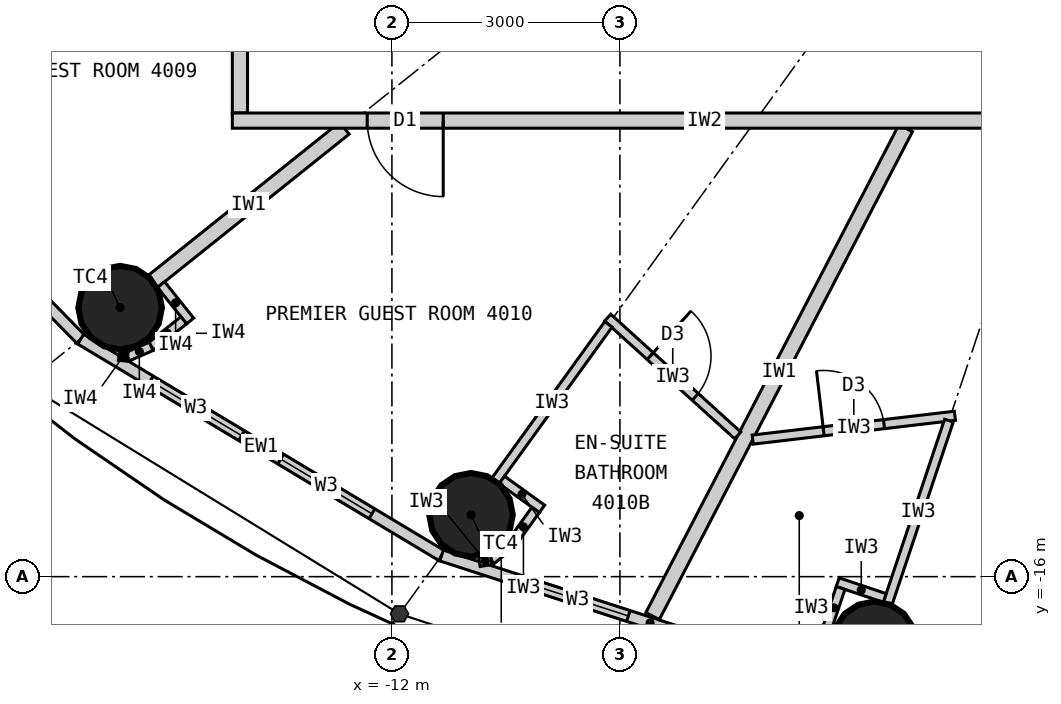
"""IFC4 building model, lengths in metres.
Left out: names, types, materials, properties, quantities, classifications, styles, units other than length and angle.
Written with IfcOpenShell. Run it as: python <this file> out.ifc"""

import sys

from ifc_helpers import new_model, si_unit, direction, frame, frame_2d, origin, origin_2d, place, context, subcontext, project, spatial, rectangle, circle, extrude, element, fill, save


model = new_model("IFC4")
c1 = context("Model", 3, precision=1e-05, world=origin(), true_north=direction((0.0, 1.0)))
c2 = subcontext(c1, "Body", "Model", "MODEL_VIEW")
j1 = project(units=[si_unit("LENGTHUNIT", "METRE"), si_unit("PLANEANGLEUNIT", "RADIAN")], contexts=[c1])
p1 = place(None, origin())
s1 = spatial("IfcSite", under=j1, at=p1, CompositionType="ELEMENT")
p2 = place(p1, origin())
s2 = spatial("IfcBuilding", under=s1, at=p2, CompositionType="ELEMENT")
p3 = place(p2, frame((0.0, 0.0, 153.3)))
s3 = spatial("IfcBuildingStorey", under=s2, at=p3, CompositionType="ELEMENT", Elevation=153.3)
for number, where, z_axis, x_axis in (
    (1, (-15.576, -12.461, 0.0), (0.0, 0.0, 1.0), (1.0, 0.0, 0.0)),
    (2, (-10.96, -15.186, 0.0), (0.0, 0.0, 1.0), (1.0, 0.0, 0.0)),
    (3, (-5.653, -16.877, 0.0), (0.0, 0.0, 1.0), (1.0, 0.0, 0.0)),
):
    element("IfcColumn", number, at=place(p3, frame(where, z_axis=z_axis, x_axis=x_axis)), inside=s3, PredefinedType="COLUMN", context=c2, shape_type="SweptSolid", body=[
        extrude(circle(Radius=0.55, at=origin_2d()), origin(), (0.0, 0.0, 1.0), 3.3),
    ])
p4 = place(p3, frame((-19.772, -9.132, 0.0), z_axis=(0.0, 0.0, 1.0), x_axis=(0.700727467776, -0.71342905457, 0.0)))
e4 = element("IfcWall", 4, at=p4, inside=s3, PredefinedType="ELEMENTEDWALL", context=c2, shape_type="SweptSolid", body=[
    extrude(rectangle(XDim=5.247, YDim=0.15, at=frame_2d((2.624, 0.0))), origin(), (0.0, 0.0, 1.0), 3.12),
])
p5 = place(p4, frame((0.924, 0.0, 0.9)))
e5 = element("IfcOpeningElement", 5, at=p5, cuts=e4, PredefinedType="OPENING", context=c2, shape_type="SweptSolid", body=[
    extrude(rectangle(XDim=1.4, YDim=1.9, at=frame_2d((0.7, 0.95))), frame((0.0, 0.085, 0.0), z_axis=(0.0, -1.0, 0.0), x_axis=(1.0, 0.0, 0.0)), (0.0, 0.0, 1.0), 0.17),
])
p6 = place(p4, frame((2.924, 0.0, 0.9)))
e6 = element("IfcOpeningElement", 6, at=p6, cuts=e4, PredefinedType="OPENING", context=c2, shape_type="SweptSolid", body=[
    extrude(rectangle(XDim=1.4, YDim=1.9, at=frame_2d((0.7, 0.95))), frame((0.0, 0.085, 0.0), z_axis=(0.0, -1.0, 0.0), x_axis=(1.0, 0.0, 0.0)), (0.0, 0.0, 1.0), 0.17),
])
p7 = place(p3, frame((-16.095, -12.876, 0.0), z_axis=(0.0, 0.0, 1.0), x_axis=(0.857695199231, -0.514158482587, 0.0)))
e7 = element("IfcWall", 7, at=p7, inside=s3, PredefinedType="ELEMENTEDWALL", context=c2, shape_type="SweptSolid", body=[
    extrude(rectangle(XDim=5.536, YDim=0.15, at=frame_2d((2.768, 0.0))), origin(), (0.0, 0.0, 1.0), 3.12),
])
p8 = place(p7, frame((1.068, 0.0, 0.9)))
e8 = element("IfcOpeningElement", 8, at=p8, cuts=e7, PredefinedType="OPENING", context=c2, shape_type="SweptSolid", body=[
    extrude(rectangle(XDim=1.4, YDim=1.9, at=frame_2d((0.7, 0.95))), frame((0.0, 0.085, 0.0), z_axis=(0.0, -1.0, 0.0), x_axis=(1.0, 0.0, 0.0)), (0.0, 0.0, 1.0), 0.17),
])
p9 = place(p7, frame((3.068, 0.0, 0.9)))
e9 = element("IfcOpeningElement", 9, at=p9, cuts=e7, PredefinedType="OPENING", context=c2, shape_type="SweptSolid", body=[
    extrude(rectangle(XDim=1.4, YDim=1.9, at=frame_2d((0.7, 0.95))), frame((0.0, 0.085, 0.0), z_axis=(0.0, -1.0, 0.0), x_axis=(1.0, 0.0, 0.0)), (0.0, 0.0, 1.0), 0.17),
])
p10 = place(p3, frame((-11.346, -15.722, 0.0), z_axis=(0.0, 0.0, 1.0), x_axis=(0.951432482129, -0.307857486429, 0.0)))
e10 = element("IfcWall", 10, at=p10, inside=s3, PredefinedType="ELEMENTEDWALL", context=c2, shape_type="SweptSolid", body=[
    extrude(rectangle(XDim=5.766, YDim=0.15, at=frame_2d((2.883, 0.0))), origin(), (0.0, 0.0, 1.0), 3.12),
])
p11 = place(p10, frame((1.183, 0.0, 0.9)))
e11 = element("IfcOpeningElement", 11, at=p11, cuts=e10, PredefinedType="OPENING", context=c2, shape_type="SweptSolid", body=[
    extrude(rectangle(XDim=1.4, YDim=1.9, at=frame_2d((0.7, 0.95))), frame((0.0, 0.085, 0.0), z_axis=(0.0, -1.0, 0.0), x_axis=(1.0, 0.0, 0.0)), (0.0, 0.0, 1.0), 0.17),
])
p12 = place(p10, frame((3.183, 0.0, 0.9)))
e12 = element("IfcOpeningElement", 12, at=p12, cuts=e10, PredefinedType="OPENING", context=c2, shape_type="SweptSolid", body=[
    extrude(rectangle(XDim=1.4, YDim=1.9, at=frame_2d((0.7, 0.95))), frame((0.0, 0.085, 0.0), z_axis=(0.0, -1.0, 0.0), x_axis=(1.0, 0.0, 0.0)), (0.0, 0.0, 1.0), 0.17),
])
p13 = place(p3, frame((-12.625, -10.1, 0.0), z_axis=(0.0, 0.0, 1.0), x_axis=(-0.780876185034, -0.624685827954, 0.0)))
e13 = element("IfcWall", 13, at=p13, inside=s3, PredefinedType="PARTITIONING", context=c2, shape_type="SweptSolid", body=[
    extrude(rectangle(XDim=3.229, YDim=0.2, at=frame_2d((1.615, 0.0))), origin(), (0.0, 0.0, 1.0), 2.42),
])
p14 = place(p3, frame((-5.24, -10.1, 0.0), z_axis=(0.0, 0.0, 1.0), x_axis=(-0.460532965373, -0.887642601391, 0.0)))
e14 = element("IfcWall", 14, at=p14, inside=s3, PredefinedType="PARTITIONING", context=c2, shape_type="SweptSolid", body=[
    extrude(rectangle(XDim=7.231, YDim=0.2, at=frame_2d((3.616, 0.0))), origin(), (0.0, 0.0, 1.0), 3.12),
])
p15 = place(p3, frame((-7.45, -14.142, 0.0), z_axis=(0.0, 0.0, 1.0), x_axis=(-0.74113984586, 0.671350675041, 0.0)))
e15 = element("IfcWall", 15, at=p15, inside=s3, PredefinedType="PARTITIONING", context=c2, shape_type="SweptSolid", body=[
    extrude(rectangle(XDim=2.309, YDim=0.12, at=frame_2d((1.154, 0.0))), origin(), (0.0, 0.0, 1.0), 3.12),
])
p16 = place(p15, frame((0.754, 0.0, 0.0)))
e16 = element("IfcOpeningElement", 16, at=p16, cuts=e15, PredefinedType="OPENING", context=c2, shape_type="SweptSolid", body=[
    extrude(rectangle(XDim=0.8, YDim=2.1, at=frame_2d((0.4, 1.05))), frame((0.0, 0.07, 0.0), z_axis=(0.0, -1.0, 0.0), x_axis=(1.0, 0.0, 0.0)), (0.0, 0.0, 1.0), 0.14),
])
p17 = place(p3, frame((-9.151, -12.681, 0.0), z_axis=(0.0, 0.0, 1.0), x_axis=(-0.585258912334, -0.8108464747, 0.0)))
e17 = element("IfcWall", 17, at=p17, inside=s3, PredefinedType="PARTITIONING", context=c2, shape_type="SweptSolid", body=[
    extrude(rectangle(XDim=2.54, YDim=0.12, at=frame_2d((1.27, 0.0))), origin(), (0.0, 0.0, 1.0), 2.42),
])
p18 = place(p3, frame((-10.554, -14.727, 0.0), z_axis=(0.0, 0.0, 1.0), x_axis=(0.811044231224, -0.584984833135, 0.0)))
e18 = element("IfcWall", 18, at=p18, inside=s3, PredefinedType="PARTITIONING", context=c2, shape_type="SweptSolid", body=[
    extrude(rectangle(XDim=0.652, YDim=0.12, at=frame_2d((0.326, 0.0))), origin(), (0.0, 0.0, 1.0), 3.12),
])
p19 = place(p3, frame((-10.109, -15.122, 0.0), z_axis=(0.0, 0.0, 1.0), x_axis=(-0.585344718358, -0.810784534072, 0.0)))
e19 = element("IfcWall", 19, at=p19, inside=s3, PredefinedType="PARTITIONING", context=c2, shape_type="SweptSolid", body=[
    extrude(rectangle(XDim=0.55, YDim=0.12, at=frame_2d((0.275, 0.0))), origin(), (0.0, 0.0, 1.0), 3.12),
])
p20 = place(p3, frame((-10.431, -15.568, 0.0), z_axis=(0.0, 0.0, 1.0), x_axis=(-0.77505137267, -0.631898227345, 0.0)))
e20 = element("IfcWall", 20, at=p20, inside=s3, PredefinedType="PARTITIONING", context=c2, shape_type="SweptSolid", body=[
    extrude(rectangle(XDim=0.338, YDim=0.12, at=frame_2d((0.169, 0.0))), origin(), (0.0, 0.0, 1.0), 3.12),
])
p21 = place(p3, frame((-10.693, -15.781, 0.0), z_axis=(0.0, 0.0, 1.0), x_axis=(-0.987256785332, -0.159135287777, 0.0)))
e21 = element("IfcWall", 21, at=p21, inside=s3, PredefinedType="PARTITIONING", context=c2, shape_type="SweptSolid", body=[
    extrude(rectangle(XDim=0.158, YDim=0.12, at=frame_2d((0.079, 0.0))), origin(), (0.0, 0.0, 1.0), 3.12),
])
p22 = place(p3, frame((-7.253, -14.197, 0.0), z_axis=(0.0, 0.0, 1.0), x_axis=(0.993128188393, 0.117031625725, 0.0)))
e22 = element("IfcWall", 22, at=p22, inside=s3, PredefinedType="PARTITIONING", context=c2, shape_type="SweptSolid", body=[
    extrude(rectangle(XDim=2.678, YDim=0.12, at=frame_2d((1.339, 0.0))), origin(), (0.0, 0.0, 1.0), 3.12),
])
p23 = place(p22, frame((0.939, 0.0, 0.0)))
e23 = element("IfcOpeningElement", 23, at=p23, cuts=e22, PredefinedType="OPENING", context=c2, shape_type="SweptSolid", body=[
    extrude(rectangle(XDim=0.8, YDim=2.1, at=frame_2d((0.4, 1.05))), frame((0.0, 0.07, 0.0), z_axis=(0.0, -1.0, 0.0), x_axis=(1.0, 0.0, 0.0)), (0.0, 0.0, 1.0), 0.14),
])
p24 = place(p3, frame((-4.671, -13.948, 0.0), z_axis=(0.0, 0.0, 1.0), x_axis=(-0.317669167093, -0.948201613729, 0.0)))
e24 = element("IfcWall", 24, at=p24, inside=s3, PredefinedType="PARTITIONING", context=c2, shape_type="SweptSolid", body=[
    extrude(rectangle(XDim=2.54, YDim=0.12, at=frame_2d((1.27, 0.0))), origin(), (0.0, 0.0, 1.0), 2.42),
])
p25 = place(p3, frame((-5.516, -16.28, 0.0), z_axis=(0.0, 0.0, 1.0), x_axis=(-0.948157944392, 0.317799484717, 0.0)))
e25 = element("IfcWall", 25, at=p25, inside=s3, PredefinedType="PARTITIONING", context=c2, shape_type="SweptSolid", body=[
    extrude(rectangle(XDim=0.652, YDim=0.12, at=frame_2d((0.326, 0.0))), origin(), (0.0, 0.0, 1.0), 3.12),
])
p26 = place(p3, frame((-6.097, -16.149, 0.0), z_axis=(0.0, 0.0, 1.0), x_axis=(-0.317292604854, -0.948327687514, 0.0)))
e26 = element("IfcWall", 26, at=p26, inside=s3, PredefinedType="PARTITIONING", context=c2, shape_type="SweptSolid", body=[
    extrude(rectangle(XDim=0.55, YDim=0.12, at=frame_2d((0.275, 0.0))), origin(), (0.0, 0.0, 1.0), 3.12),
])
p27 = place(p3, frame((-14.0, -1.67, 0.0), z_axis=(0.0, 0.0, 1.0), x_axis=(0.0, -1.0, 0.0)))
e27 = element("IfcWall", 27, at=p27, inside=s3, PredefinedType="PARTITIONING", context=c2, shape_type="SweptSolid", body=[
    extrude(rectangle(XDim=8.23, YDim=0.2, at=frame_2d((4.115, 0.0))), origin(), (0.0, 0.0, 1.0), 3.12),
])
p28 = place(p27, frame((5.552, 0.0, 0.0)))
e28 = element("IfcOpeningElement", 28, at=p28, cuts=e27, PredefinedType="OPENING", context=c2, shape_type="SweptSolid", body=[
    extrude(rectangle(XDim=1.0, YDim=2.2, at=frame_2d((0.5, 1.1))), frame((0.0, 0.11, 0.0), z_axis=(0.0, -1.0, 0.0), x_axis=(1.0, 0.0, 0.0)), (0.0, 0.0, 1.0), 0.22),
])
p29 = place(p3, frame((-1.67, -10.0, 0.0), z_axis=(0.0, 0.0, 1.0), x_axis=(-1.0, 0.0, 0.0)))
e29 = element("IfcWall", 29, at=p29, inside=s3, PredefinedType="PARTITIONING", context=c2, shape_type="SweptSolid", body=[
    extrude(rectangle(XDim=12.43, YDim=0.2, at=frame_2d((6.215, 0.0))), origin(), (0.0, 0.0, 1.0), 3.12),
])
p30 = place(p29, frame((9.655, 0.0, 0.0)))
e30 = element("IfcOpeningElement", 30, at=p30, cuts=e29, PredefinedType="OPENING", context=c2, shape_type="SweptSolid", body=[
    extrude(rectangle(XDim=1.0, YDim=2.2, at=frame_2d((0.5, 1.1))), frame((0.0, 0.11, 0.0), z_axis=(0.0, -1.0, 0.0), x_axis=(1.0, 0.0, 0.0)), (0.0, 0.0, 1.0), 0.22),
])
p31 = place(p3, frame((-15.037, -12.158, 0.0), z_axis=(0.0, 0.0, 1.0), x_axis=(0.624840920722, -0.78075208856, 0.0)))
e31 = element("IfcWall", 31, at=p31, inside=s3, PredefinedType="PARTITIONING", context=c2, shape_type="SweptSolid", body=[
    extrude(rectangle(XDim=0.612, YDim=0.12, at=frame_2d((0.306, 0.0))), origin(), (0.0, 0.0, 1.0), 3.12),
])
p32 = place(p3, frame((-14.739, -12.627, 0.0), z_axis=(0.0, 0.0, 1.0), x_axis=(-0.780912119987, -0.624640905527, 0.0)))
e32 = element("IfcWall", 32, at=p32, inside=s3, PredefinedType="PARTITIONING", context=c2, shape_type="SweptSolid", body=[
    extrude(rectangle(XDim=0.55, YDim=0.12, at=frame_2d((0.275, 0.0))), origin(), (0.0, 0.0, 1.0), 3.12),
])
p33 = place(p3, frame((-15.169, -12.97, 0.0), z_axis=(0.0, 0.0, 1.0), x_axis=(-0.915974725257, -0.401235968838, 0.0)))
e33 = element("IfcWall", 33, at=p33, inside=s3, PredefinedType="PARTITIONING", context=c2, shape_type="SweptSolid", body=[
    extrude(rectangle(XDim=0.338, YDim=0.12, at=frame_2d((0.169, 0.0))), origin(), (0.0, 0.0, 1.0), 3.12),
])
p34 = place(p3, frame((-15.478, -13.106, 0.0), z_axis=(0.0, 0.0, 1.0), x_axis=(-0.993778813557, 0.111371763588, 0.0)))
e34 = element("IfcWall", 34, at=p34, inside=s3, PredefinedType="PARTITIONING", context=c2, shape_type="SweptSolid", body=[
    extrude(rectangle(XDim=0.114, YDim=0.12, at=frame_2d((0.057, 0.0))), origin(), (0.0, 0.0, 1.0), 3.12),
])
p35 = place(p8, origin())
e35 = element("IfcWindow", 35, at=p35, inside=s3, PartitioningType="SINGLE_PANEL", PredefinedType="WINDOW", context=c2, shape_type="SweptSolid", body=[
    extrude(rectangle(XDim=1.4, YDim=1.9, at=frame_2d((0.7, 0.95))), frame((0.0, 0.03, 0.0), z_axis=(0.0, -1.0, 0.0), x_axis=(1.0, 0.0, 0.0)), (0.0, 0.0, 1.0), 0.06),
])
fill(e8, e35)
p36 = place(p9, origin())
e36 = element("IfcWindow", 36, at=p36, inside=s3, PartitioningType="SINGLE_PANEL", PredefinedType="WINDOW", context=c2, shape_type="SweptSolid", body=[
    extrude(rectangle(XDim=1.4, YDim=1.9, at=frame_2d((0.7, 0.95))), frame((0.0, 0.03, 0.0), z_axis=(0.0, -1.0, 0.0), x_axis=(1.0, 0.0, 0.0)), (0.0, 0.0, 1.0), 0.06),
])
fill(e9, e36)
p37 = place(p11, origin())
e37 = element("IfcWindow", 37, at=p37, inside=s3, PartitioningType="SINGLE_PANEL", PredefinedType="WINDOW", context=c2, shape_type="SweptSolid", body=[
    extrude(rectangle(XDim=1.4, YDim=1.9, at=frame_2d((0.7, 0.95))), frame((0.0, 0.03, 0.0), z_axis=(0.0, -1.0, 0.0), x_axis=(1.0, 0.0, 0.0)), (0.0, 0.0, 1.0), 0.06),
])
fill(e11, e37)
p38 = place(p16, origin())
e38 = element("IfcDoor", 38, at=p38, inside=s3, OperationType="SINGLE_SWING_RIGHT", PredefinedType="DOOR", context=c2, shape_type="SweptSolid", body=[
    extrude(rectangle(XDim=0.8, YDim=2.1, at=frame_2d((0.4, 1.05))), frame((0.0, 0.025, 0.0), z_axis=(0.0, -1.0, 0.0), x_axis=(1.0, 0.0, 0.0)), (0.0, 0.0, 1.0), 0.05),
])
fill(e16, e38)
p39 = place(p30, origin())
e39 = element("IfcDoor", 39, at=p39, inside=s3, OperationType="SINGLE_SWING_LEFT", PredefinedType="DOOR", context=c2, shape_type="SweptSolid", body=[
    extrude(rectangle(XDim=1.0, YDim=2.2, at=frame_2d((0.5, 1.1))), frame((0.0, 0.025, 0.0), z_axis=(0.0, -1.0, 0.0), x_axis=(1.0, 0.0, 0.0)), (0.0, 0.0, 1.0), 0.05),
])
fill(e30, e39)
p40 = place(p23, origin())
e40 = element("IfcDoor", 40, at=p40, inside=s3, OperationType="SINGLE_SWING_LEFT", PredefinedType="DOOR", context=c2, shape_type="SweptSolid", body=[
    extrude(rectangle(XDim=0.8, YDim=2.1, at=frame_2d((0.4, 1.05))), frame((0.0, 0.025, 0.0), z_axis=(0.0, -1.0, 0.0), x_axis=(1.0, 0.0, 0.0)), (0.0, 0.0, 1.0), 0.05),
])
fill(e23, e40)
save(model, sys.argv[1])
